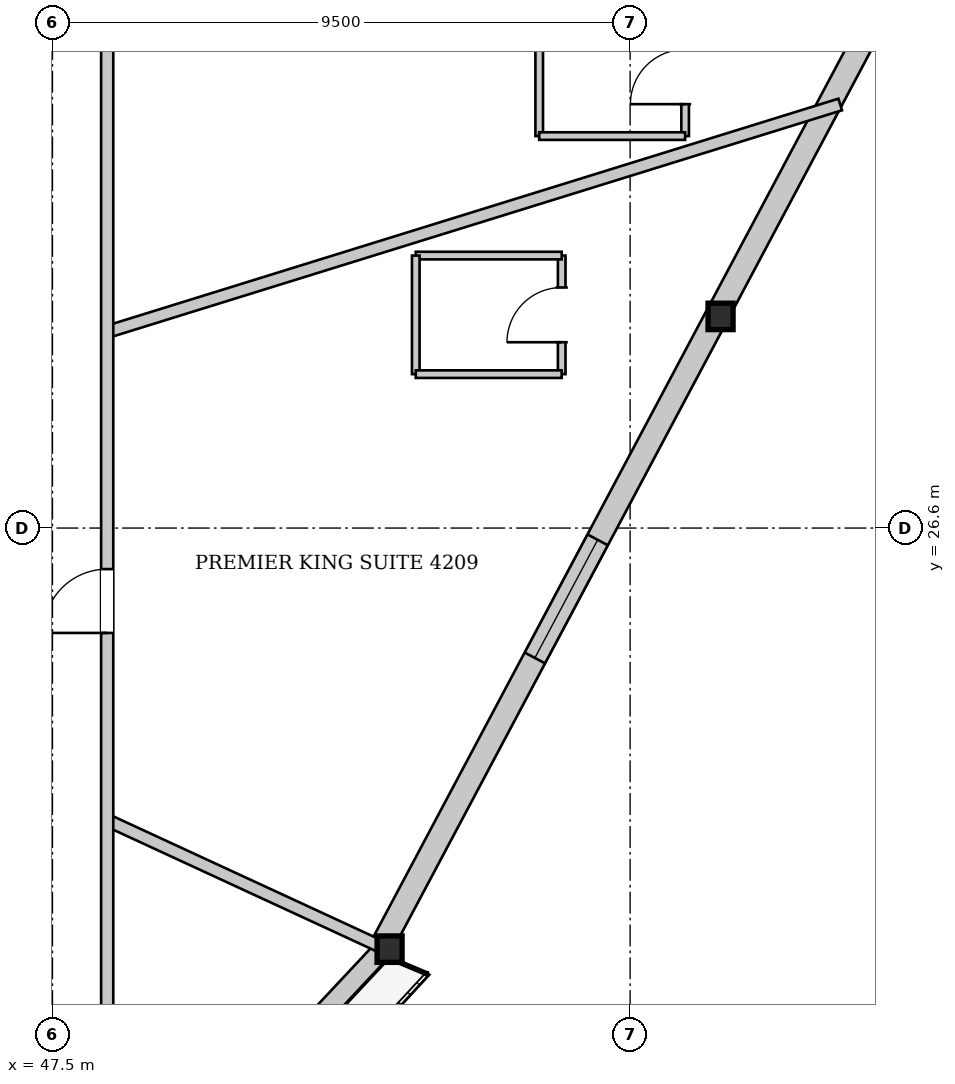
"""IFC4 building model, lengths in metres.
Left out: names, types, materials, properties, quantities, classifications, styles, units other than length and angle.
Written with IfcOpenShell. Run it as: python <this file> out.ifc"""

import sys

from ifc_helpers import new_model, si_unit, direction, frame, frame_2d, origin, origin_2d, place, context, subcontext, project, spatial, rectangle, i_section, extrude, source, transform, mapped, element, fill, save


model = new_model("IFC4")
c1 = context("Model", 3, precision=1e-05, world=origin(), true_north=direction((0.0, 1.0)))
c2 = subcontext(c1, "Body", "Model", "MODEL_VIEW")
j1 = project(units=[si_unit("LENGTHUNIT", "METRE"), si_unit("PLANEANGLEUNIT", "RADIAN")], contexts=[c1])
p1 = place(None, origin())
s1 = spatial("IfcSite", under=j1, at=p1, CompositionType="ELEMENT")
p2 = place(p1, origin())
s2 = spatial("IfcBuilding", under=s1, at=p2, CompositionType="ELEMENT")
p3 = place(p2, frame((0.0, 0.0, 160.8)))
s3 = spatial("IfcBuildingStorey", under=s2, at=p3, CompositionType="ELEMENT", Elevation=160.8)
m1 = source(origin(), c2, "Body", "SweptSolid", [
    extrude(i_section(OverallWidth=0.412, OverallDepth=0.435, WebThickness=0.031, FlangeThickness=0.05, at=origin_2d()), origin(), (0.0, 0.0, 1.0), 3.397),
])
p4 = place(p3, frame((53.027, 19.535, 0.0), z_axis=(0.010134590283, 0.08215487017, 0.996568044534), x_axis=(-0.992476960813, 0.122431541098, 0.0)))
e1 = element("IfcColumn", 1, at=p4, inside=s3, PredefinedType="COLUMN", context=c2, shape_type="MappedRepresentation", body=[
    mapped(m1, transform((0.0, 0.0, 0.0), x_axis=(1.0, 0.0, 0.0), y_axis=(0.0, 1.0, 0.0), z_axis=(0.0, 0.0, 1.0), scale=1.0)),
])
m2 = source(origin(), c2, "Body", "SweptSolid", [
    extrude(i_section(OverallWidth=0.412, OverallDepth=0.435, WebThickness=0.031, FlangeThickness=0.05, at=origin_2d()), origin(), (0.0, 0.0, 1.0), 3.404),
])
p5 = place(p3, frame((58.546, 29.911, 0.0), z_axis=(-0.033996381091, 0.09976575126, 0.994430008069), x_axis=(-0.946552690509, -0.322549227391, 0.0)))
e2 = element("IfcColumn", 2, at=p5, inside=s3, PredefinedType="COLUMN", context=c2, shape_type="MappedRepresentation", body=[
    mapped(m2, transform((0.0, 0.0, 0.0), x_axis=(1.0, 0.0, 0.0), y_axis=(0.0, 1.0, 0.0), z_axis=(0.0, 0.0, 1.0), scale=1.0)),
])
p6 = place(p3, frame((52.91, 19.645, 0.0), z_axis=(0.0, 0.0, 1.0), x_axis=(-0.683193045934, -0.730237811941, 0.0)))
e3 = element("IfcWall", 3, at=p6, inside=s3, PredefinedType="SOLIDWALL", context=c2, shape_type="SweptSolid", body=[
    extrude(rectangle(XDim=23.503, YDim=0.32, at=frame_2d((11.752, 0.0))), origin(), (0.0, 0.0, 1.0), 2.722),
])
p7 = place(p6, frame((6.771, 0.0, 0.0)))
e4 = element("IfcOpeningElement", 4, at=p7, cuts=e3, PredefinedType="OPENING", context=c2, shape_type="SweptSolid", body=[
    extrude(rectangle(XDim=1.5, YDim=2.3, at=frame_2d((0.75, 1.15))), frame((0.0, 0.17, 0.0), z_axis=(0.0, -1.0, 0.0), x_axis=(1.0, 0.0, 0.0)), (0.0, 0.0, 1.0), 0.34),
])
p8 = place(p6, frame((16.093, 0.0, 0.252)))
e5 = element("IfcOpeningElement", 5, at=p8, cuts=e3, PredefinedType="OPENING", context=c2, shape_type="SweptSolid", body=[
    extrude(rectangle(XDim=2.6, YDim=2.35, at=frame_2d((1.3, 1.175))), frame((0.0, 0.17, 0.0), z_axis=(0.0, -1.0, 0.0), x_axis=(1.0, 0.0, 0.0)), (0.0, 0.0, 1.0), 0.34),
])
p9 = place(p3, frame((63.896, 40.375, 0.0), z_axis=(0.0, 0.0, 1.0), x_axis=(-0.469579724412, -0.882890073804, 0.0)))
e6 = element("IfcWall", 6, at=p9, inside=s3, PredefinedType="SOLIDWALL", context=c2, shape_type="SweptSolid", body=[
    extrude(rectangle(XDim=23.503, YDim=0.38, at=frame_2d((11.751, 0.0))), origin(), (0.0, 0.0, 1.0), 2.722),
])
p10 = place(p9, frame((4.381, 0.0, 0.352)))
e7 = element("IfcOpeningElement", 7, at=p10, cuts=e6, PredefinedType="OPENING", context=c2, shape_type="SweptSolid", body=[
    extrude(rectangle(XDim=2.2, YDim=2.25, at=frame_2d((1.1, 1.125))), frame((0.0, 0.2, 0.0), z_axis=(0.0, -1.0, 0.0), x_axis=(1.0, 0.0, 0.0)), (0.0, 0.0, 1.0), 0.4),
])
p11 = place(p9, frame((15.822, 0.0, 0.352)))
e8 = element("IfcOpeningElement", 8, at=p11, cuts=e6, PredefinedType="OPENING", context=c2, shape_type="SweptSolid", body=[
    extrude(rectangle(XDim=2.2, YDim=2.25, at=frame_2d((1.1, 1.125))), frame((0.0, 0.2, 0.0), z_axis=(0.0, -1.0, 0.0), x_axis=(1.0, 0.0, 0.0)), (0.0, 0.0, 1.0), 0.4),
])
p12 = place(p3, frame((48.4, 21.795, 0.0), z_axis=(0.0, 0.0, 1.0), x_axis=(0.907789198347, -0.419426717515, 0.0)))
e9 = element("IfcWall", 9, at=p12, inside=s3, PredefinedType="PARTITIONING", context=c2, shape_type="SweptSolid", body=[
    extrude(rectangle(XDim=5.125, YDim=0.2, at=frame_2d((2.562, 0.0))), origin(), (0.0, 0.0, 1.0), 2.865),
])
p13 = place(p3, frame((48.4, 29.826, 0.0), z_axis=(0.0, 0.0, 1.0), x_axis=(0.955101512308, 0.296278755883, 0.0)))
e10 = element("IfcWall", 10, at=p13, inside=s3, PredefinedType="PARTITIONING", context=c2, shape_type="SweptSolid", body=[
    extrude(rectangle(XDim=12.622, YDim=0.2, at=frame_2d((6.311, 0.0))), origin(), (0.0, 0.0, 1.0), 3.33),
])
p14 = place(p3, frame((55.875, 29.131, 0.0), z_axis=(0.0, 0.0, 1.0), x_axis=(0.0, 1.0, 0.0)))
e11 = element("IfcWall", 11, at=p14, inside=s3, PredefinedType="PARTITIONING", context=c2, shape_type="SweptSolid", body=[
    extrude(rectangle(XDim=1.95, YDim=0.125, at=frame_2d((0.975, 0.0))), origin(), (0.0, 0.0, 1.0), 3.33),
])
p15 = place(p14, frame((0.525, 0.0, 0.0)))
e12 = element("IfcOpeningElement", 12, at=p15, cuts=e11, PredefinedType="OPENING", context=c2, shape_type="SweptSolid", body=[
    extrude(rectangle(XDim=0.9, YDim=2.1, at=frame_2d((0.45, 1.05))), frame((0.0, 0.073, 0.0), z_axis=(0.0, -1.0, 0.0), x_axis=(1.0, 0.0, 0.0)), (0.0, 0.0, 1.0), 0.145),
])
p16 = place(p3, frame((55.875, 31.081, 0.0), z_axis=(0.0, 0.0, 1.0), x_axis=(-1.0, 0.0, 0.0)))
e13 = element("IfcWall", 13, at=p16, inside=s3, PredefinedType="PARTITIONING", context=c2, shape_type="SweptSolid", body=[
    extrude(rectangle(XDim=2.4, YDim=0.125, at=frame_2d((1.2, 0.0))), origin(), (0.0, 0.0, 1.0), 3.33),
])
p17 = place(p3, frame((53.475, 31.081, 0.0), z_axis=(0.0, 0.0, 1.0), x_axis=(0.0, -1.0, 0.0)))
e14 = element("IfcWall", 14, at=p17, inside=s3, PredefinedType="PARTITIONING", context=c2, shape_type="SweptSolid", body=[
    extrude(rectangle(XDim=1.95, YDim=0.125, at=frame_2d((0.975, 0.0))), origin(), (0.0, 0.0, 1.0), 3.33),
])
p18 = place(p3, frame((53.475, 29.131, 0.0), z_axis=(0.0, 0.0, 1.0), x_axis=(1.0, 0.0, 0.0)))
e15 = element("IfcWall", 15, at=p18, inside=s3, PredefinedType="PARTITIONING", context=c2, shape_type="SweptSolid", body=[
    extrude(rectangle(XDim=2.4, YDim=0.125, at=frame_2d((1.2, 0.0))), origin(), (0.0, 0.0, 1.0), 3.33),
])
p19 = place(p3, frame((57.905, 33.046, 0.0), z_axis=(0.0, 0.0, 1.0), x_axis=(0.0, 1.0, 0.0)))
e16 = element("IfcWall", 16, at=p19, inside=s3, PredefinedType="PARTITIONING", context=c2, shape_type="SweptSolid", body=[
    extrude(rectangle(XDim=1.95, YDim=0.125, at=frame_2d((0.975, 0.0))), origin(), (0.0, 0.0, 1.0), 3.33),
])
p20 = place(p19, frame((0.525, 0.0, 0.0)))
e17 = element("IfcOpeningElement", 17, at=p20, cuts=e16, PredefinedType="OPENING", context=c2, shape_type="SweptSolid", body=[
    extrude(rectangle(XDim=0.9, YDim=2.1, at=frame_2d((0.45, 1.05))), frame((0.0, 0.073, 0.0), z_axis=(0.0, -1.0, 0.0), x_axis=(1.0, 0.0, 0.0)), (0.0, 0.0, 1.0), 0.145),
])
p21 = place(p3, frame((55.505, 34.996, 0.0), z_axis=(0.0, 0.0, 1.0), x_axis=(0.0, -1.0, 0.0)))
e18 = element("IfcWall", 18, at=p21, inside=s3, PredefinedType="PARTITIONING", context=c2, shape_type="SweptSolid", body=[
    extrude(rectangle(XDim=1.95, YDim=0.125, at=frame_2d((0.975, 0.0))), origin(), (0.0, 0.0, 1.0), 3.33),
])
p22 = place(p3, frame((55.505, 33.046, 0.0), z_axis=(0.0, 0.0, 1.0), x_axis=(1.0, 0.0, 0.0)))
e19 = element("IfcWall", 19, at=p22, inside=s3, PredefinedType="PARTITIONING", context=c2, shape_type="SweptSolid", body=[
    extrude(rectangle(XDim=2.4, YDim=0.125, at=frame_2d((1.2, 0.0))), origin(), (0.0, 0.0, 1.0), 3.33),
])
p23 = place(p3, frame((48.4, 17.0, 0.0), z_axis=(0.0, 0.0, 1.0), x_axis=(0.0, 1.0, 0.0)))
e20 = element("IfcWall", 20, at=p23, inside=s3, PredefinedType="PARTITIONING", context=c2, shape_type="SweptSolid", body=[
    extrude(rectangle(XDim=19.2, YDim=0.2, at=frame_2d((9.6, 0.0))), origin(), (0.0, 0.0, 1.0), 3.33),
])
p24 = place(p23, frame((7.875, 0.0, 0.0)))
e21 = element("IfcOpeningElement", 21, at=p24, cuts=e20, PredefinedType="OPENING", context=c2, shape_type="SweptSolid", body=[
    extrude(rectangle(XDim=1.05, YDim=2.2, at=frame_2d((0.525, 1.1))), frame((0.0, 0.11, 0.0), z_axis=(0.0, -1.0, 0.0), x_axis=(1.0, 0.0, 0.0)), (0.0, 0.0, 1.0), 0.22),
])
p25 = place(p23, frame((17.85, 0.0, 0.0)))
e22 = element("IfcOpeningElement", 22, at=p25, cuts=e20, PredefinedType="OPENING", context=c2, shape_type="SweptSolid", body=[
    extrude(rectangle(XDim=1.05, YDim=2.2, at=frame_2d((0.525, 1.1))), frame((0.0, 0.11, 0.0), z_axis=(0.0, -1.0, 0.0), x_axis=(1.0, 0.0, 0.0)), (0.0, 0.0, 1.0), 0.22),
])
m3 = source(origin(), c2, "Body", "SweptSolid", [
    extrude(rectangle(XDim=2.2, YDim=2.25, at=frame_2d((1.1, 1.125))), frame((0.0, 0.03, 0.0), z_axis=(0.0, -1.0, 0.0), x_axis=(1.0, 0.0, 0.0)), (0.0, 0.0, 1.0), 0.06),
])
p26 = place(p11, origin())
e23 = element("IfcWindow", 23, at=p26, inside=s3, PartitioningType="SINGLE_PANEL", PredefinedType="WINDOW", context=c2, shape_type="MappedRepresentation", body=[
    mapped(m3, transform((0.0, 0.0, 0.0), x_axis=(1.0, 0.0, 0.0), y_axis=(0.0, 1.0, 0.0), z_axis=(0.0, 0.0, 1.0), scale=1.0)),
])
fill(e8, e23)
m4 = source(origin(), c2, "Body", "SweptSolid", [
    extrude(rectangle(XDim=0.9, YDim=2.1, at=frame_2d((0.45, 1.05))), frame((0.0, 0.025, 0.0), z_axis=(0.0, -1.0, 0.0), x_axis=(1.0, 0.0, 0.0)), (0.0, 0.0, 1.0), 0.05),
])
p27 = place(p15, origin())
e24 = element("IfcDoor", 24, at=p27, inside=s3, OperationType="SINGLE_SWING_LEFT", PredefinedType="DOOR", context=c2, shape_type="MappedRepresentation", body=[
    mapped(m4, transform((0.0, 0.0, 0.0), x_axis=(1.0, 0.0, 0.0), y_axis=(0.0, 1.0, 0.0), z_axis=(0.0, 0.0, 1.0), scale=1.0)),
])
fill(e12, e24)
p28 = place(p20, origin())
e25 = element("IfcDoor", 25, at=p28, inside=s3, OperationType="SINGLE_SWING_LEFT", PredefinedType="DOOR", context=c2, shape_type="MappedRepresentation", body=[
    mapped(m4, transform((0.0, 0.0, 0.0), x_axis=(1.0, 0.0, 0.0), y_axis=(0.0, 1.0, 0.0), z_axis=(0.0, 0.0, 1.0), scale=1.0)),
])
fill(e17, e25)
m5 = source(origin(), c2, "Body", "SweptSolid", [
    extrude(rectangle(XDim=1.05, YDim=2.2, at=frame_2d((0.525, 1.1))), frame((0.0, 0.025, 0.0), z_axis=(0.0, -1.0, 0.0), x_axis=(1.0, 0.0, 0.0)), (0.0, 0.0, 1.0), 0.05),
])
p29 = place(p24, origin())
e26 = element("IfcDoor", 26, at=p29, inside=s3, OperationType="SINGLE_SWING_LEFT", PredefinedType="DOOR", context=c2, shape_type="MappedRepresentation", body=[
    mapped(m5, transform((0.0, 0.0, 0.0), x_axis=(1.0, 0.0, 0.0), y_axis=(0.0, 1.0, 0.0), z_axis=(0.0, 0.0, 1.0), scale=1.0)),
])
fill(e21, e26)
save(model, sys.argv[1])
